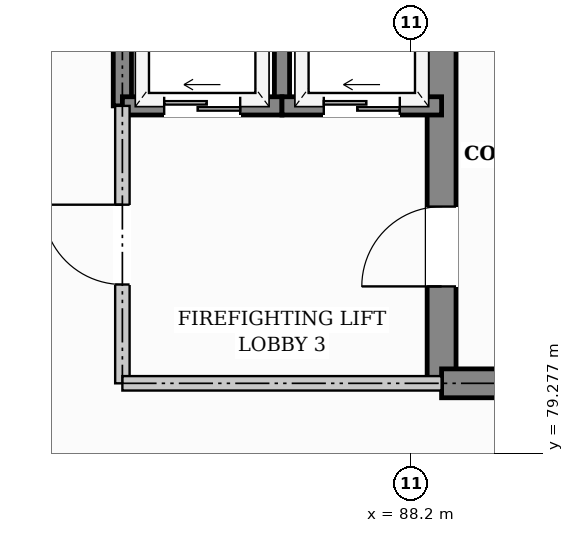
"""IFC4 building model, lengths in metres.
Left out: names, types, materials, properties, quantities, classifications, styles, units other than length and angle.
Written with IfcOpenShell. Run it as: python <this file> out.ifc"""

import sys

from ifc_helpers import new_model, si_unit, direction, frame, frame_2d, origin, place, context, subcontext, project, spatial, rectangle, extrude, element, fill, save


model = new_model("IFC4")
c1 = context("Model", 3, precision=1e-05, world=origin(), true_north=direction((0.0, 1.0)))
c2 = subcontext(c1, "Body", "Model", "MODEL_VIEW")
j1 = project(units=[si_unit("LENGTHUNIT", "METRE"), si_unit("PLANEANGLEUNIT", "RADIAN")], contexts=[c1])
p1 = place(None, origin())
s1 = spatial("IfcSite", under=j1, at=p1, CompositionType="ELEMENT")
p2 = place(p1, origin())
s2 = spatial("IfcBuilding", under=s1, at=p2, CompositionType="ELEMENT")
p3 = place(p2, frame((0.0, 0.0, 9.6)))
s3 = spatial("IfcBuildingStorey", under=s2, at=p3, CompositionType="ELEMENT", Elevation=9.6)
p4 = place(p3, frame((88.6, 80.2, 0.0), z_axis=(0.0, 0.0, 1.0), x_axis=(0.0, 1.0, 0.0)))
e1 = element("IfcWall", 1, at=p4, inside=s3, PredefinedType="SHEAR", context=c2, shape_type="SweptSolid", body=[
    extrude(rectangle(XDim=6.0, YDim=0.38, at=frame_2d((3.0, 0.0))), origin(), (0.0, 0.0, 1.0), 3.28),
])
p5 = place(p4, frame((1.275, 0.0, 0.0)))
e2 = element("IfcOpeningElement", 2, at=p5, cuts=e1, PredefinedType="OPENING", context=c2, shape_type="SweptSolid", body=[
    extrude(rectangle(XDim=1.05, YDim=2.15, at=frame_2d((0.525, 1.075))), frame((0.0, 0.2, 0.0), z_axis=(0.0, -1.0, 0.0), x_axis=(1.0, 0.0, 0.0)), (0.0, 0.0, 1.0), 0.4),
])
p6 = place(p3, frame((88.6, 80.2, 0.0), z_axis=(0.0, 0.0, 1.0), x_axis=(1.0, 0.0, 0.0)))
e3 = element("IfcWall", 3, at=p6, inside=s3, PredefinedType="SHEAR", context=c2, shape_type="SweptSolid", body=[
    extrude(rectangle(XDim=7.0, YDim=0.38, at=frame_2d((3.5, 0.0))), origin(), (0.0, 0.0, 1.0), 3.28),
])
p7 = place(p3, frame((84.4, 83.85, 0.0), z_axis=(0.0, 0.0, 1.0), x_axis=(0.0, 1.0, 0.0)))
e4 = element("IfcWall", 4, at=p7, inside=s3, PredefinedType="SHEAR", context=c2, shape_type="SweptSolid", body=[
    extrude(rectangle(XDim=2.35, YDim=0.24, at=frame_2d((1.175, 0.0))), origin(), (0.0, 0.0, 1.0), 3.28),
])
p8 = place(p3, frame((86.5, 83.85, 0.0), z_axis=(0.0, 0.0, 1.0), x_axis=(0.0, 1.0, 0.0)))
e5 = element("IfcWall", 5, at=p8, inside=s3, PredefinedType="SHEAR", context=c2, shape_type="SweptSolid", body=[
    extrude(rectangle(XDim=2.35, YDim=0.2, at=frame_2d((1.175, 0.0))), origin(), (0.0, 0.0, 1.0), 3.28),
])
p9 = place(p3, frame((84.4, 83.85, 0.0), z_axis=(0.0, 0.0, 1.0), x_axis=(1.0, 0.0, 0.0)))
e6 = element("IfcWall", 6, at=p9, inside=s3, PredefinedType="SHEAR", context=c2, shape_type="SweptSolid", body=[
    extrude(rectangle(XDim=2.1, YDim=0.24, at=frame_2d((1.05, 0.0))), origin(), (0.0, 0.0, 1.0), 3.28),
])
p10 = place(p9, frame((0.55, 0.0, 0.0)))
e7 = element("IfcOpeningElement", 7, at=p10, cuts=e6, PredefinedType="OPENING", context=c2, shape_type="SweptSolid", body=[
    extrude(rectangle(XDim=1.0, YDim=2.1, at=frame_2d((0.5, 1.05))), frame((0.0, 0.13, 0.0), z_axis=(0.0, -1.0, 0.0), x_axis=(1.0, 0.0, 0.0)), (0.0, 0.0, 1.0), 0.26),
])
p11 = place(p3, frame((86.5, 83.85, 0.0), z_axis=(0.0, 0.0, 1.0), x_axis=(1.0, 0.0, 0.0)))
e8 = element("IfcWall", 8, at=p11, inside=s3, PredefinedType="SHEAR", context=c2, shape_type="SweptSolid", body=[
    extrude(rectangle(XDim=2.1, YDim=0.24, at=frame_2d((1.05, 0.0))), origin(), (0.0, 0.0, 1.0), 3.28),
])
p12 = place(p11, frame((0.55, 0.0, 0.0)))
e9 = element("IfcOpeningElement", 9, at=p12, cuts=e8, PredefinedType="OPENING", context=c2, shape_type="SweptSolid", body=[
    extrude(rectangle(XDim=1.0, YDim=2.1, at=frame_2d((0.5, 1.05))), frame((0.0, 0.13, 0.0), z_axis=(0.0, -1.0, 0.0), x_axis=(1.0, 0.0, 0.0)), (0.0, 0.0, 1.0), 0.26),
])
p13 = place(p3, frame((84.4, 80.2, 0.0), z_axis=(0.0, 0.0, 1.0), x_axis=(0.0, 1.0, 0.0)))
e10 = element("IfcWall", 10, at=p13, inside=s3, PredefinedType="PARTITIONING", context=c2, shape_type="SweptSolid", body=[
    extrude(rectangle(XDim=3.65, YDim=0.19, at=frame_2d((1.825, 0.0))), origin(), (0.0, 0.0, 1.0), 3.28),
])
p14 = place(p13, frame((1.3, 0.0, 0.0)))
e11 = element("IfcOpeningElement", 11, at=p14, cuts=e10, PredefinedType="OPENING", context=c2, shape_type="SweptSolid", body=[
    extrude(rectangle(XDim=1.05, YDim=2.15, at=frame_2d((0.525, 1.075))), frame((0.0, 0.105, 0.0), z_axis=(0.0, -1.0, 0.0), x_axis=(1.0, 0.0, 0.0)), (0.0, 0.0, 1.0), 0.21),
])
p15 = place(p3, frame((84.4, 80.2, 0.0), z_axis=(0.0, 0.0, 1.0), x_axis=(1.0, 0.0, 0.0)))
e12 = element("IfcWall", 12, at=p15, inside=s3, PredefinedType="PARTITIONING", context=c2, shape_type="SweptSolid", body=[
    extrude(rectangle(XDim=4.2, YDim=0.19, at=frame_2d((2.1, 0.0))), origin(), (0.0, 0.0, 1.0), 3.28),
])
p16 = place(p5, origin())
e13 = element("IfcDoor", 13, at=p16, inside=s3, OperationType="SINGLE_SWING_LEFT", PredefinedType="DOOR", context=c2, shape_type="SweptSolid", body=[
    extrude(rectangle(XDim=1.05, YDim=2.15, at=frame_2d((0.525, 1.075))), frame((0.0, 0.025, 0.0), z_axis=(0.0, -1.0, 0.0), x_axis=(1.0, 0.0, 0.0)), (0.0, 0.0, 1.0), 0.05),
])
fill(e2, e13)
p17 = place(p10, origin())
e14 = element("IfcDoor", 14, at=p17, inside=s3, OperationType="SLIDING_TO_LEFT", PredefinedType="DOOR", context=c2, shape_type="SweptSolid", body=[
    extrude(rectangle(XDim=1.0, YDim=2.1, at=frame_2d((0.5, 1.05))), frame((0.0, 0.025, 0.0), z_axis=(0.0, -1.0, 0.0), x_axis=(1.0, 0.0, 0.0)), (0.0, 0.0, 1.0), 0.05),
])
fill(e7, e14)
p18 = place(p12, origin())
e15 = element("IfcDoor", 15, at=p18, inside=s3, OperationType="SLIDING_TO_LEFT", PredefinedType="DOOR", context=c2, shape_type="SweptSolid", body=[
    extrude(rectangle(XDim=1.0, YDim=2.1, at=frame_2d((0.5, 1.05))), frame((0.0, 0.025, 0.0), z_axis=(0.0, -1.0, 0.0), x_axis=(1.0, 0.0, 0.0)), (0.0, 0.0, 1.0), 0.05),
])
fill(e9, e15)
p19 = place(p14, origin())
e16 = element("IfcDoor", 16, at=p19, inside=s3, OperationType="SINGLE_SWING_RIGHT", PredefinedType="DOOR", context=c2, shape_type="SweptSolid", body=[
    extrude(rectangle(XDim=1.05, YDim=2.15, at=frame_2d((0.525, 1.075))), frame((0.0, 0.025, 0.0), z_axis=(0.0, -1.0, 0.0), x_axis=(1.0, 0.0, 0.0)), (0.0, 0.0, 1.0), 0.05),
])
fill(e11, e16)
save(model, sys.argv[1])
